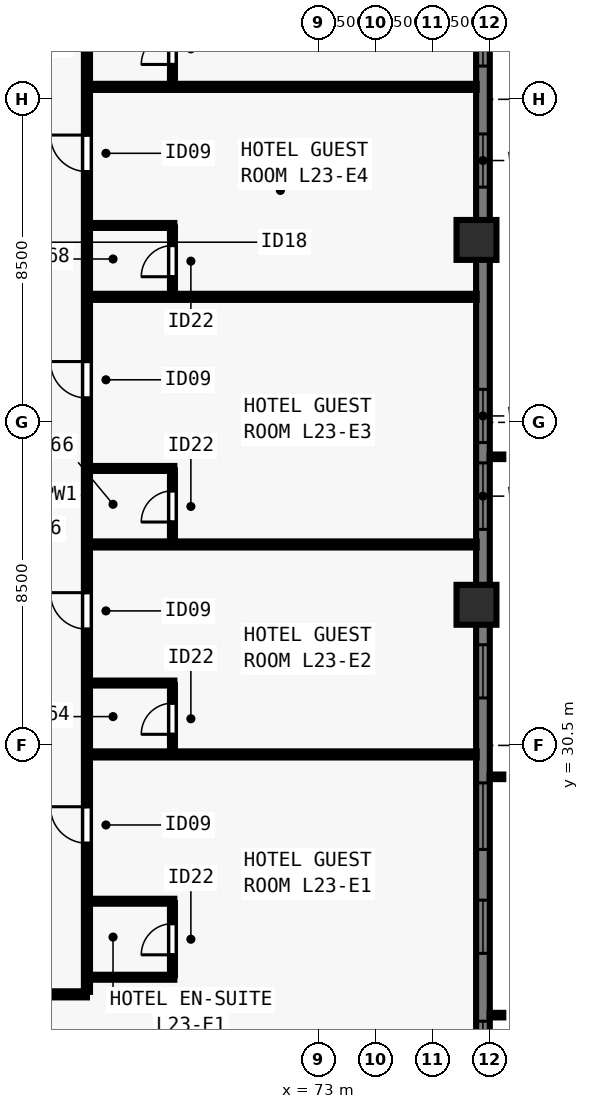
"""IFC4 building model, lengths in metres.
Left out: names, types, materials, properties, quantities, classifications, styles, units other than length and angle.
Written with IfcOpenShell. Run it as: python <this file> out.ifc"""

import sys

from ifc_helpers import new_model, si_unit, direction, frame, frame_2d, origin, origin_2d, place, context, subcontext, project, spatial, rectangle, extrude, element, fill, save


model = new_model("IFC4")
c1 = context("Model", 3, precision=1e-05, world=origin(), true_north=direction((0.0, 1.0)))
c2 = subcontext(c1, "Body", "Model", "MODEL_VIEW")
j1 = project(units=[si_unit("LENGTHUNIT", "METRE"), si_unit("PLANEANGLEUNIT", "RADIAN")], contexts=[c1])
p1 = place(None, origin())
s1 = spatial("IfcSite", under=j1, at=p1, CompositionType="ELEMENT")
p2 = place(p1, origin())
s2 = spatial("IfcBuilding", under=s1, at=p2, CompositionType="ELEMENT")
p3 = place(p2, frame((0.0, 0.0, 86.5)))
s3 = spatial("IfcBuildingStorey", under=s2, at=p3, CompositionType="ELEMENT", Elevation=86.5)
for number, where, z_axis, x_axis in (
    (1, (77.15, 34.2, 0.0), (0.0, 0.0, 1.0), (0.0, 1.0, 0.0)),
    (2, (77.15, 43.8, 0.0), (0.0, 0.0, 1.0), (0.0, 1.0, 0.0)),
):
    element("IfcColumn", number, at=place(p3, frame(where, z_axis=z_axis, x_axis=x_axis)), inside=s3, PredefinedType="COLUMN", context=c2, shape_type="SweptSolid", body=[
        extrude(rectangle(XDim=1.05, YDim=1.05, at=origin_2d()), origin(), (0.0, 0.0, 1.0), 3.5),
    ])
p4 = place(p3, frame((77.32, 61.5, 0.0), z_axis=(0.0, 0.0, 1.0), x_axis=(0.0, -1.0, 0.0)))
e3 = element("IfcWall", 3, at=p4, inside=s3, PredefinedType="SOLIDWALL", context=c2, shape_type="SweptSolid", body=[
    extrude(rectangle(XDim=44.662, YDim=0.36, at=frame_2d((22.331, 0.0))), origin(), (0.0, 0.0, 1.0), 3.28),
])
p5 = place(p4, frame((8.19, 0.0, 0.8)))
e4 = element("IfcOpeningElement", 4, at=p5, cuts=e3, PredefinedType="OPENING", context=c2, shape_type="SweptSolid", body=[
    extrude(rectangle(XDim=1.4, YDim=1.544, at=frame_2d((0.7, 0.772))), frame((0.0, 0.19, 0.0), z_axis=(0.0, -1.0, 0.0), x_axis=(1.0, 0.0, 0.0)), (0.0, 0.0, 1.0), 0.38),
])
p6 = place(p4, frame((11.375, 0.0, 0.8)))
e5 = element("IfcOpeningElement", 5, at=p6, cuts=e3, PredefinedType="OPENING", context=c2, shape_type="SweptSolid", body=[
    extrude(rectangle(XDim=1.75, YDim=1.544, at=frame_2d((0.875, 0.772))), frame((0.0, 0.19, 0.0), z_axis=(0.0, -1.0, 0.0), x_axis=(1.0, 0.0, 0.0)), (0.0, 0.0, 1.0), 0.38),
])
p7 = place(p4, frame((14.911, 0.0, 0.8)))
e6 = element("IfcOpeningElement", 6, at=p7, cuts=e3, PredefinedType="OPENING", context=c2, shape_type="SweptSolid", body=[
    extrude(rectangle(XDim=1.4, YDim=1.544, at=frame_2d((0.7, 0.772))), frame((0.0, 0.19, 0.0), z_axis=(0.0, -1.0, 0.0), x_axis=(1.0, 0.0, 0.0)), (0.0, 0.0, 1.0), 0.38),
])
p8 = place(p4, frame((21.631, 0.0, 0.8)))
e7 = element("IfcOpeningElement", 7, at=p8, cuts=e3, PredefinedType="OPENING", context=c2, shape_type="SweptSolid", body=[
    extrude(rectangle(XDim=1.4, YDim=1.544, at=frame_2d((0.7, 0.772))), frame((0.0, 0.19, 0.0), z_axis=(0.0, -1.0, 0.0), x_axis=(1.0, 0.0, 0.0)), (0.0, 0.0, 1.0), 0.38),
])
p9 = place(p4, frame((23.566, 0.0, 0.8)))
e8 = element("IfcOpeningElement", 8, at=p9, cuts=e3, PredefinedType="OPENING", context=c2, shape_type="SweptSolid", body=[
    extrude(rectangle(XDim=1.75, YDim=1.544, at=frame_2d((0.875, 0.772))), frame((0.0, 0.19, 0.0), z_axis=(0.0, -1.0, 0.0), x_axis=(1.0, 0.0, 0.0)), (0.0, 0.0, 1.0), 0.38),
])
p10 = place(p4, frame((28.351, 0.0, 0.8)))
e9 = element("IfcOpeningElement", 9, at=p10, cuts=e3, PredefinedType="OPENING", context=c2, shape_type="SweptSolid", body=[
    extrude(rectangle(XDim=1.4, YDim=1.544, at=frame_2d((0.7, 0.772))), frame((0.0, 0.19, 0.0), z_axis=(0.0, -1.0, 0.0), x_axis=(1.0, 0.0, 0.0)), (0.0, 0.0, 1.0), 0.38),
])
p11 = place(p4, frame((31.987, 0.0, 0.8)))
e10 = element("IfcOpeningElement", 10, at=p11, cuts=e3, PredefinedType="OPENING", context=c2, shape_type="SweptSolid", body=[
    extrude(rectangle(XDim=1.75, YDim=1.544, at=frame_2d((0.875, 0.772))), frame((0.0, 0.19, 0.0), z_axis=(0.0, -1.0, 0.0), x_axis=(1.0, 0.0, 0.0)), (0.0, 0.0, 1.0), 0.38),
])
p12 = place(p4, frame((35.072, 0.0, 0.8)))
e11 = element("IfcOpeningElement", 11, at=p12, cuts=e3, PredefinedType="OPENING", context=c2, shape_type="SweptSolid", body=[
    extrude(rectangle(XDim=1.4, YDim=1.544, at=frame_2d((0.7, 0.772))), frame((0.0, 0.19, 0.0), z_axis=(0.0, -1.0, 0.0), x_axis=(1.0, 0.0, 0.0)), (0.0, 0.0, 1.0), 0.38),
])
p13 = place(p4, frame((38.257, 0.0, 0.8)))
e12 = element("IfcOpeningElement", 12, at=p13, cuts=e3, PredefinedType="OPENING", context=c2, shape_type="SweptSolid", body=[
    extrude(rectangle(XDim=1.75, YDim=1.544, at=frame_2d((0.875, 0.772))), frame((0.0, 0.19, 0.0), z_axis=(0.0, -1.0, 0.0), x_axis=(1.0, 0.0, 0.0)), (0.0, 0.0, 1.0), 0.38),
])
p14 = place(p3, frame((37.1, 23.95, 0.0), z_axis=(0.0, 0.0, 1.0), x_axis=(1.0, 0.0, 0.0)))
e13 = element("IfcWall", 13, at=p14, inside=s3, PredefinedType="PARTITIONING", context=c2, shape_type="SweptSolid", body=[
    extrude(rectangle(XDim=29.8, YDim=0.16, at=frame_2d((14.9, 0.0))), origin(), (0.0, 0.0, 1.0), 3.28),
])
p15 = place(p14, frame((2.571, 0.0, 0.0)))
e14 = element("IfcOpeningElement", 14, at=p15, cuts=e13, PredefinedType="OPENING", context=c2, shape_type="SweptSolid", body=[
    extrude(rectangle(XDim=0.96, YDim=2.15, at=frame_2d((0.48, 1.075))), frame((0.0, 0.09, 0.0), z_axis=(0.0, -1.0, 0.0), x_axis=(1.0, 0.0, 0.0)), (0.0, 0.0, 1.0), 0.18),
])
p16 = place(p14, frame((15.42, 0.0, 0.0)))
e15 = element("IfcOpeningElement", 15, at=p16, cuts=e13, PredefinedType="OPENING", context=c2, shape_type="SweptSolid", body=[
    extrude(rectangle(XDim=0.96, YDim=2.15, at=frame_2d((0.48, 1.075))), frame((0.0, 0.09, 0.0), z_axis=(0.0, -1.0, 0.0), x_axis=(1.0, 0.0, 0.0)), (0.0, 0.0, 1.0), 0.18),
])
p17 = place(p14, frame((27.269, 0.0, 0.0)))
e16 = element("IfcOpeningElement", 16, at=p17, cuts=e13, PredefinedType="OPENING", context=c2, shape_type="SweptSolid", body=[
    extrude(rectangle(XDim=0.96, YDim=2.15, at=frame_2d((0.48, 1.075))), frame((0.0, 0.09, 0.0), z_axis=(0.0, -1.0, 0.0), x_axis=(1.0, 0.0, 0.0)), (0.0, 0.0, 1.0), 0.18),
])
p18 = place(p3, frame((66.9, 24.015, 0.0), z_axis=(0.0, 0.0, 1.0), x_axis=(0.0, 1.0, 0.0)))
e17 = element("IfcWall", 17, at=p18, inside=s3, PredefinedType="PARTITIONING", context=c2, shape_type="SweptSolid", body=[
    extrude(rectangle(XDim=29.97, YDim=0.16, at=frame_2d((14.985, 0.0))), origin(), (0.0, 0.0, 1.0), 3.28),
])
p19 = place(p18, frame((3.911, 0.0, 0.0)))
e18 = element("IfcOpeningElement", 18, at=p19, cuts=e17, PredefinedType="OPENING", context=c2, shape_type="SweptSolid", body=[
    extrude(rectangle(XDim=0.96, YDim=2.15, at=frame_2d((0.48, 1.075))), frame((0.0, 0.09, 0.0), z_axis=(0.0, -1.0, 0.0), x_axis=(1.0, 0.0, 0.0)), (0.0, 0.0, 1.0), 0.18),
])
p20 = place(p18, frame((9.544, 0.0, 0.0)))
e19 = element("IfcOpeningElement", 19, at=p20, cuts=e17, PredefinedType="OPENING", context=c2, shape_type="SweptSolid", body=[
    extrude(rectangle(XDim=0.96, YDim=2.15, at=frame_2d((0.48, 1.075))), frame((0.0, 0.09, 0.0), z_axis=(0.0, -1.0, 0.0), x_axis=(1.0, 0.0, 0.0)), (0.0, 0.0, 1.0), 0.18),
])
p21 = place(p18, frame((15.625, 0.0, 0.0)))
e20 = element("IfcOpeningElement", 20, at=p21, cuts=e17, PredefinedType="OPENING", context=c2, shape_type="SweptSolid", body=[
    extrude(rectangle(XDim=0.96, YDim=2.15, at=frame_2d((0.48, 1.075))), frame((0.0, 0.09, 0.0), z_axis=(0.0, -1.0, 0.0), x_axis=(1.0, 0.0, 0.0)), (0.0, 0.0, 1.0), 0.18),
])
p22 = place(p18, frame((21.584, 0.0, 0.0)))
e21 = element("IfcOpeningElement", 21, at=p22, cuts=e17, PredefinedType="OPENING", context=c2, shape_type="SweptSolid", body=[
    extrude(rectangle(XDim=0.96, YDim=2.15, at=frame_2d((0.48, 1.075))), frame((0.0, 0.09, 0.0), z_axis=(0.0, -1.0, 0.0), x_axis=(1.0, 0.0, 0.0)), (0.0, 0.0, 1.0), 0.18),
])
p23 = place(p18, frame((27.494, 0.0, 0.0)))
e22 = element("IfcOpeningElement", 22, at=p23, cuts=e17, PredefinedType="OPENING", context=c2, shape_type="SweptSolid", body=[
    extrude(rectangle(XDim=0.96, YDim=2.15, at=frame_2d((0.48, 1.075))), frame((0.0, 0.09, 0.0), z_axis=(0.0, -1.0, 0.0), x_axis=(1.0, 0.0, 0.0)), (0.0, 0.0, 1.0), 0.18),
])
p24 = place(p3, frame((66.965, 24.4, 0.0), z_axis=(0.0, 0.0, 1.0), x_axis=(1.0, 0.0, 0.0)))
e23 = element("IfcWall", 23, at=p24, inside=s3, PredefinedType="PLUMBINGWALL", context=c2, shape_type="SweptSolid", body=[
    extrude(rectangle(XDim=2.235, YDim=0.13, at=frame_2d((1.117, 0.0))), origin(), (0.0, 0.0, 1.0), 2.849),
])
p25 = place(p3, frame((66.965, 26.4, 0.0), z_axis=(0.0, 0.0, 1.0), x_axis=(1.0, 0.0, 0.0)))
e24 = element("IfcWall", 24, at=p25, inside=s3, PredefinedType="PLUMBINGWALL", context=c2, shape_type="SweptSolid", body=[
    extrude(rectangle(XDim=2.235, YDim=0.13, at=frame_2d((1.117, 0.0))), origin(), (0.0, 0.0, 1.0), 3.28),
])
p26 = place(p3, frame((69.15, 24.45, 0.0), z_axis=(0.0, 0.0, 1.0), x_axis=(0.0, 1.0, 0.0)))
e25 = element("IfcWall", 25, at=p26, inside=s3, PredefinedType="PLUMBINGWALL", context=c2, shape_type="SweptSolid", body=[
    extrude(rectangle(XDim=1.9, YDim=0.13, at=frame_2d((0.95, 0.0))), origin(), (0.0, 0.0, 1.0), 3.28),
])
p27 = place(p26, frame((0.54, 0.0, 0.0)))
e26 = element("IfcOpeningElement", 26, at=p27, cuts=e25, PredefinedType="OPENING", context=c2, shape_type="SweptSolid", body=[
    extrude(rectangle(XDim=0.82, YDim=2.1, at=frame_2d((0.41, 1.05))), frame((0.0, 0.075, 0.0), z_axis=(0.0, -1.0, 0.0), x_axis=(1.0, 0.0, 0.0)), (0.0, 0.0, 1.0), 0.15),
])
p28 = place(p3, frame((66.965, 30.262, 0.0), z_axis=(0.0, 0.0, 1.0), x_axis=(1.0, 0.0, 0.0)))
e27 = element("IfcWall", 27, at=p28, inside=s3, PredefinedType="PARTITIONING", context=c2, shape_type="SweptSolid", body=[
    extrude(rectangle(XDim=10.19, YDim=0.16, at=frame_2d((5.095, 0.0))), origin(), (0.0, 0.0, 1.0), 3.28),
])
p29 = place(p3, frame((66.965, 32.141, 0.0), z_axis=(0.0, 0.0, 1.0), x_axis=(1.0, 0.0, 0.0)))
e28 = element("IfcWall", 28, at=p29, inside=s3, PredefinedType="PLUMBINGWALL", context=c2, shape_type="SweptSolid", body=[
    extrude(rectangle(XDim=2.235, YDim=0.13, at=frame_2d((1.117, 0.0))), origin(), (0.0, 0.0, 1.0), 2.439),
])
p30 = place(p3, frame((69.15, 30.327, 0.0), z_axis=(0.0, 0.0, 1.0), x_axis=(0.0, 1.0, 0.0)))
e29 = element("IfcWall", 29, at=p30, inside=s3, PredefinedType="PLUMBINGWALL", context=c2, shape_type="SweptSolid", body=[
    extrude(rectangle(XDim=1.764, YDim=0.13, at=frame_2d((0.882, 0.0))), origin(), (0.0, 0.0, 1.0), 3.28),
])
p31 = place(p30, frame((0.464, 0.0, 0.0)))
e30 = element("IfcOpeningElement", 30, at=p31, cuts=e29, PredefinedType="OPENING", context=c2, shape_type="SweptSolid", body=[
    extrude(rectangle(XDim=0.82, YDim=2.1, at=frame_2d((0.41, 1.05))), frame((0.0, 0.075, 0.0), z_axis=(0.0, -1.0, 0.0), x_axis=(1.0, 0.0, 0.0)), (0.0, 0.0, 1.0), 0.15),
])
p32 = place(p3, frame((66.965, 35.788, 0.0), z_axis=(0.0, 0.0, 1.0), x_axis=(1.0, 0.0, 0.0)))
e31 = element("IfcWall", 31, at=p32, inside=s3, PredefinedType="PARTITIONING", context=c2, shape_type="SweptSolid", body=[
    extrude(rectangle(XDim=10.19, YDim=0.16, at=frame_2d((5.095, 0.0))), origin(), (0.0, 0.0, 1.0), 3.28),
])
p33 = place(p3, frame((66.965, 37.788, 0.0), z_axis=(0.0, 0.0, 1.0), x_axis=(1.0, 0.0, 0.0)))
e32 = element("IfcWall", 32, at=p33, inside=s3, PredefinedType="PLUMBINGWALL", context=c2, shape_type="SweptSolid", body=[
    extrude(rectangle(XDim=2.235, YDim=0.13, at=frame_2d((1.117, 0.0))), origin(), (0.0, 0.0, 1.0), 3.28),
])
p34 = place(p3, frame((69.15, 35.853, 0.0), z_axis=(0.0, 0.0, 1.0), x_axis=(0.0, 1.0, 0.0)))
e33 = element("IfcWall", 33, at=p34, inside=s3, PredefinedType="PLUMBINGWALL", context=c2, shape_type="SweptSolid", body=[
    extrude(rectangle(XDim=1.885, YDim=0.13, at=frame_2d((0.942, 0.0))), origin(), (0.0, 0.0, 1.0), 3.28),
])
p35 = place(p34, frame((0.525, 0.0, 0.0)))
e34 = element("IfcOpeningElement", 34, at=p35, cuts=e33, PredefinedType="OPENING", context=c2, shape_type="SweptSolid", body=[
    extrude(rectangle(XDim=0.82, YDim=2.1, at=frame_2d((0.41, 1.05))), frame((0.0, 0.075, 0.0), z_axis=(0.0, -1.0, 0.0), x_axis=(1.0, 0.0, 0.0)), (0.0, 0.0, 1.0), 0.15),
])
p36 = place(p3, frame((66.965, 42.302, 0.0), z_axis=(0.0, 0.0, 1.0), x_axis=(1.0, 0.0, 0.0)))
e35 = element("IfcWall", 35, at=p36, inside=s3, PredefinedType="PARTITIONING", context=c2, shape_type="SweptSolid", body=[
    extrude(rectangle(XDim=10.19, YDim=0.16, at=frame_2d((5.095, 0.0))), origin(), (0.0, 0.0, 1.0), 3.28),
])
p37 = place(p3, frame((66.965, 44.181, 0.0), z_axis=(0.0, 0.0, 1.0), x_axis=(1.0, 0.0, 0.0)))
e36 = element("IfcWall", 36, at=p37, inside=s3, PredefinedType="PLUMBINGWALL", context=c2, shape_type="SweptSolid", body=[
    extrude(rectangle(XDim=2.235, YDim=0.13, at=frame_2d((1.117, 0.0))), origin(), (0.0, 0.0, 1.0), 3.28),
])
p38 = place(p3, frame((69.15, 42.367, 0.0), z_axis=(0.0, 0.0, 1.0), x_axis=(0.0, 1.0, 0.0)))
e37 = element("IfcWall", 37, at=p38, inside=s3, PredefinedType="PLUMBINGWALL", context=c2, shape_type="SweptSolid", body=[
    extrude(rectangle(XDim=1.764, YDim=0.13, at=frame_2d((0.882, 0.0))), origin(), (0.0, 0.0, 1.0), 3.28),
])
p39 = place(p38, frame((0.464, 0.0, 0.0)))
e38 = element("IfcOpeningElement", 38, at=p39, cuts=e37, PredefinedType="OPENING", context=c2, shape_type="SweptSolid", body=[
    extrude(rectangle(XDim=0.82, YDim=2.1, at=frame_2d((0.41, 1.05))), frame((0.0, 0.075, 0.0), z_axis=(0.0, -1.0, 0.0), x_axis=(1.0, 0.0, 0.0)), (0.0, 0.0, 1.0), 0.15),
])
p40 = place(p3, frame((66.965, 47.827, 0.0), z_axis=(0.0, 0.0, 1.0), x_axis=(1.0, 0.0, 0.0)))
e39 = element("IfcWall", 39, at=p40, inside=s3, PredefinedType="PARTITIONING", context=c2, shape_type="SweptSolid", body=[
    extrude(rectangle(XDim=10.19, YDim=0.16, at=frame_2d((5.095, 0.0))), origin(), (0.0, 0.0, 1.0), 3.28),
])
p41 = place(p3, frame((69.15, 47.893, 0.0), z_axis=(0.0, 0.0, 1.0), x_axis=(0.0, 1.0, 0.0)))
e40 = element("IfcWall", 40, at=p41, inside=s3, PredefinedType="PLUMBINGWALL", context=c2, shape_type="SweptSolid", body=[
    extrude(rectangle(XDim=1.885, YDim=0.13, at=frame_2d((0.942, 0.0))), origin(), (0.0, 0.0, 1.0), 3.28),
])
p42 = place(p41, frame((0.525, 0.0, 0.0)))
e41 = element("IfcOpeningElement", 41, at=p42, cuts=e40, PredefinedType="OPENING", context=c2, shape_type="SweptSolid", body=[
    extrude(rectangle(XDim=0.82, YDim=2.1, at=frame_2d((0.41, 1.05))), frame((0.0, 0.075, 0.0), z_axis=(0.0, -1.0, 0.0), x_axis=(1.0, 0.0, 0.0)), (0.0, 0.0, 1.0), 0.15),
])
p43 = place(p6, origin())
e42 = element("IfcWindow", 42, at=p43, inside=s3, PartitioningType="SINGLE_PANEL", PredefinedType="WINDOW", context=c2, shape_type="SweptSolid", body=[
    extrude(rectangle(XDim=1.75, YDim=1.544, at=frame_2d((0.875, 0.772))), frame((0.0, -0.05, 0.0), z_axis=(0.0, -1.0, 0.0), x_axis=(1.0, 0.0, 0.0)), (0.0, 0.0, 1.0), 0.06),
])
fill(e5, e42)
p44 = place(p7, origin())
e43 = element("IfcWindow", 43, at=p44, inside=s3, PartitioningType="SINGLE_PANEL", PredefinedType="WINDOW", context=c2, shape_type="SweptSolid", body=[
    extrude(rectangle(XDim=1.4, YDim=1.544, at=frame_2d((0.7, 0.772))), frame((0.0, -0.05, 0.0), z_axis=(0.0, -1.0, 0.0), x_axis=(1.0, 0.0, 0.0)), (0.0, 0.0, 1.0), 0.06),
])
fill(e6, e43)
p45 = place(p8, origin())
e44 = element("IfcWindow", 44, at=p45, inside=s3, PartitioningType="SINGLE_PANEL", PredefinedType="WINDOW", context=c2, shape_type="SweptSolid", body=[
    extrude(rectangle(XDim=1.4, YDim=1.544, at=frame_2d((0.7, 0.772))), frame((0.0, -0.05, 0.0), z_axis=(0.0, -1.0, 0.0), x_axis=(1.0, 0.0, 0.0)), (0.0, 0.0, 1.0), 0.06),
])
fill(e7, e44)
p46 = place(p9, origin())
e45 = element("IfcWindow", 45, at=p46, inside=s3, PartitioningType="SINGLE_PANEL", PredefinedType="WINDOW", context=c2, shape_type="SweptSolid", body=[
    extrude(rectangle(XDim=1.75, YDim=1.544, at=frame_2d((0.875, 0.772))), frame((0.0, -0.05, 0.0), z_axis=(0.0, -1.0, 0.0), x_axis=(1.0, 0.0, 0.0)), (0.0, 0.0, 1.0), 0.06),
])
fill(e8, e45)
p47 = place(p10, origin())
e46 = element("IfcWindow", 46, at=p47, inside=s3, PartitioningType="SINGLE_PANEL", PredefinedType="WINDOW", context=c2, shape_type="SweptSolid", body=[
    extrude(rectangle(XDim=1.4, YDim=1.544, at=frame_2d((0.7, 0.772))), frame((0.0, -0.05, 0.0), z_axis=(0.0, -1.0, 0.0), x_axis=(1.0, 0.0, 0.0)), (0.0, 0.0, 1.0), 0.06),
])
fill(e9, e46)
p48 = place(p11, origin())
e47 = element("IfcWindow", 47, at=p48, inside=s3, PartitioningType="SINGLE_PANEL", PredefinedType="WINDOW", context=c2, shape_type="SweptSolid", body=[
    extrude(rectangle(XDim=1.75, YDim=1.544, at=frame_2d((0.875, 0.772))), frame((0.0, -0.05, 0.0), z_axis=(0.0, -1.0, 0.0), x_axis=(1.0, 0.0, 0.0)), (0.0, 0.0, 1.0), 0.06),
])
fill(e10, e47)
p49 = place(p12, origin())
e48 = element("IfcWindow", 48, at=p49, inside=s3, PartitioningType="SINGLE_PANEL", PredefinedType="WINDOW", context=c2, shape_type="SweptSolid", body=[
    extrude(rectangle(XDim=1.4, YDim=1.544, at=frame_2d((0.7, 0.772))), frame((0.0, -0.05, 0.0), z_axis=(0.0, -1.0, 0.0), x_axis=(1.0, 0.0, 0.0)), (0.0, 0.0, 1.0), 0.06),
])
fill(e11, e48)
p50 = place(p13, origin())
e49 = element("IfcWindow", 49, at=p50, inside=s3, PartitioningType="SINGLE_PANEL", PredefinedType="WINDOW", context=c2, shape_type="SweptSolid", body=[
    extrude(rectangle(XDim=1.75, YDim=1.544, at=frame_2d((0.875, 0.772))), frame((0.0, -0.05, 0.0), z_axis=(0.0, -1.0, 0.0), x_axis=(1.0, 0.0, 0.0)), (0.0, 0.0, 1.0), 0.06),
])
fill(e12, e49)
p51 = place(p27, origin())
e50 = element("IfcDoor", 50, at=p51, inside=s3, OperationType="SINGLE_SWING_LEFT", PredefinedType="DOOR", context=c2, shape_type="SweptSolid", body=[
    extrude(rectangle(XDim=0.82, YDim=2.1, at=frame_2d((0.41, 1.05))), frame((0.0, 0.025, 0.0), z_axis=(0.0, -1.0, 0.0), x_axis=(1.0, 0.0, 0.0)), (0.0, 0.0, 1.0), 0.05),
])
fill(e26, e50)
p52 = place(p19, origin())
e51 = element("IfcDoor", 51, at=p52, inside=s3, OperationType="SINGLE_SWING_RIGHT", PredefinedType="DOOR", context=c2, shape_type="SweptSolid", body=[
    extrude(rectangle(XDim=0.96, YDim=2.15, at=frame_2d((0.48, 1.075))), frame((0.0, 0.025, 0.0), z_axis=(0.0, -1.0, 0.0), x_axis=(1.0, 0.0, 0.0)), (0.0, 0.0, 1.0), 0.05),
])
fill(e18, e51)
p53 = place(p31, origin())
e52 = element("IfcDoor", 52, at=p53, inside=s3, OperationType="SINGLE_SWING_LEFT", PredefinedType="DOOR", context=c2, shape_type="SweptSolid", body=[
    extrude(rectangle(XDim=0.82, YDim=2.1, at=frame_2d((0.41, 1.05))), frame((0.0, 0.025, 0.0), z_axis=(0.0, -1.0, 0.0), x_axis=(1.0, 0.0, 0.0)), (0.0, 0.0, 1.0), 0.05),
])
fill(e30, e52)
p54 = place(p20, origin())
e53 = element("IfcDoor", 53, at=p54, inside=s3, OperationType="SINGLE_SWING_RIGHT", PredefinedType="DOOR", context=c2, shape_type="SweptSolid", body=[
    extrude(rectangle(XDim=0.96, YDim=2.15, at=frame_2d((0.48, 1.075))), frame((0.0, 0.025, 0.0), z_axis=(0.0, -1.0, 0.0), x_axis=(1.0, 0.0, 0.0)), (0.0, 0.0, 1.0), 0.05),
])
fill(e19, e53)
p55 = place(p35, origin())
e54 = element("IfcDoor", 54, at=p55, inside=s3, OperationType="SINGLE_SWING_LEFT", PredefinedType="DOOR", context=c2, shape_type="SweptSolid", body=[
    extrude(rectangle(XDim=0.82, YDim=2.1, at=frame_2d((0.41, 1.05))), frame((0.0, 0.025, 0.0), z_axis=(0.0, -1.0, 0.0), x_axis=(1.0, 0.0, 0.0)), (0.0, 0.0, 1.0), 0.05),
])
fill(e34, e54)
p56 = place(p21, origin())
e55 = element("IfcDoor", 55, at=p56, inside=s3, OperationType="SINGLE_SWING_RIGHT", PredefinedType="DOOR", context=c2, shape_type="SweptSolid", body=[
    extrude(rectangle(XDim=0.96, YDim=2.15, at=frame_2d((0.48, 1.075))), frame((0.0, 0.025, 0.0), z_axis=(0.0, -1.0, 0.0), x_axis=(1.0, 0.0, 0.0)), (0.0, 0.0, 1.0), 0.05),
])
fill(e20, e55)
p57 = place(p39, origin())
e56 = element("IfcDoor", 56, at=p57, inside=s3, OperationType="SINGLE_SWING_LEFT", PredefinedType="DOOR", context=c2, shape_type="SweptSolid", body=[
    extrude(rectangle(XDim=0.82, YDim=2.1, at=frame_2d((0.41, 1.05))), frame((0.0, 0.025, 0.0), z_axis=(0.0, -1.0, 0.0), x_axis=(1.0, 0.0, 0.0)), (0.0, 0.0, 1.0), 0.05),
])
fill(e38, e56)
p58 = place(p22, origin())
e57 = element("IfcDoor", 57, at=p58, inside=s3, OperationType="SINGLE_SWING_RIGHT", PredefinedType="DOOR", context=c2, shape_type="SweptSolid", body=[
    extrude(rectangle(XDim=0.96, YDim=2.15, at=frame_2d((0.48, 1.075))), frame((0.0, 0.025, 0.0), z_axis=(0.0, -1.0, 0.0), x_axis=(1.0, 0.0, 0.0)), (0.0, 0.0, 1.0), 0.05),
])
fill(e21, e57)
p59 = place(p42, origin())
e58 = element("IfcDoor", 58, at=p59, inside=s3, OperationType="SINGLE_SWING_LEFT", PredefinedType="DOOR", context=c2, shape_type="SweptSolid", body=[
    extrude(rectangle(XDim=0.82, YDim=2.1, at=frame_2d((0.41, 1.05))), frame((0.0, 0.025, 0.0), z_axis=(0.0, -1.0, 0.0), x_axis=(1.0, 0.0, 0.0)), (0.0, 0.0, 1.0), 0.05),
])
fill(e41, e58)
save(model, sys.argv[1])
